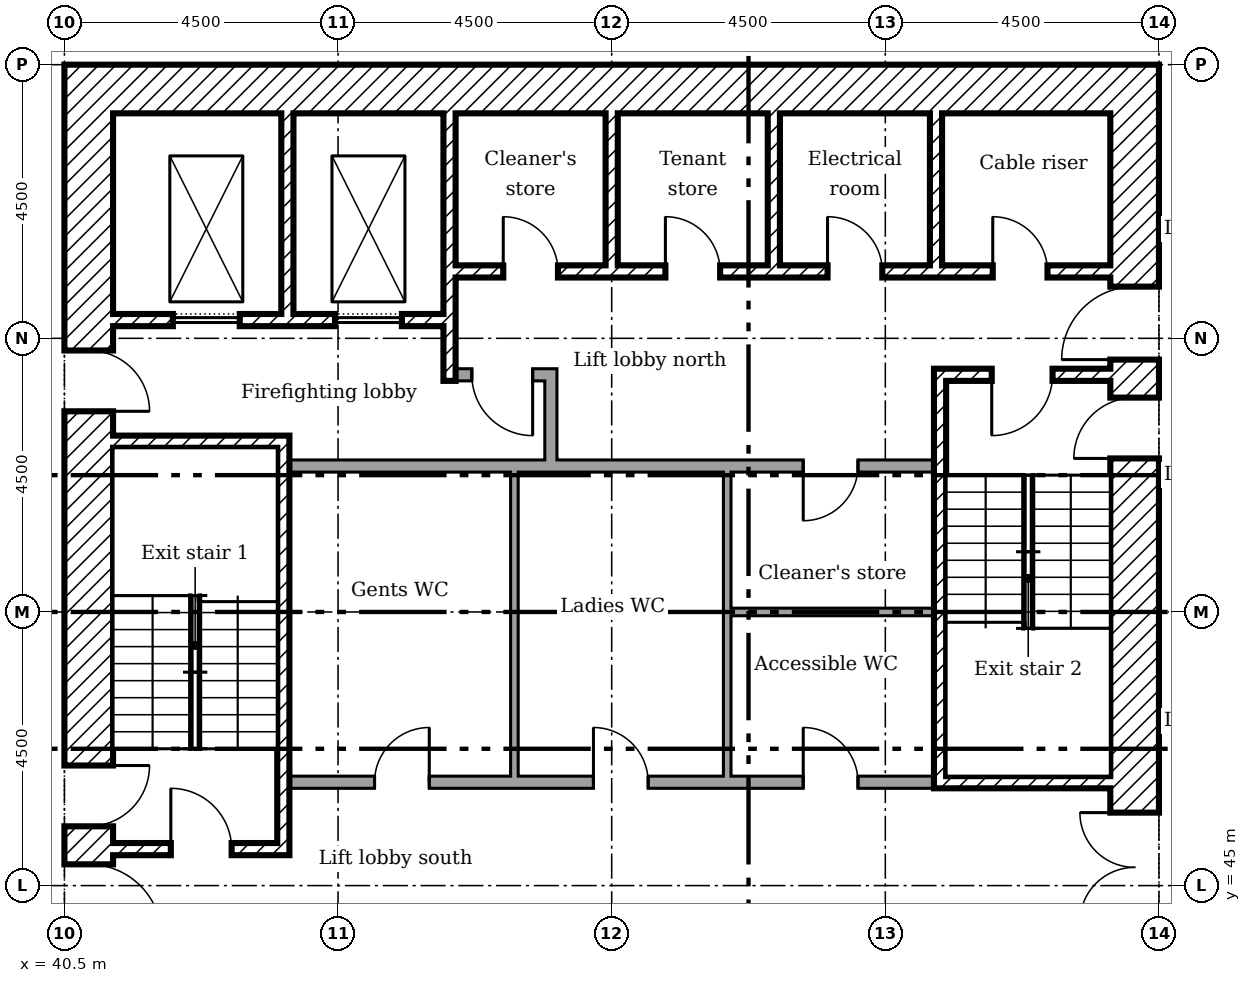
"""IFC4 building model, lengths in metres.
Left out: names, types, materials, properties, quantities, classifications, styles, units other than length and angle.
Written with IfcOpenShell. Run it as: python <this file> out.ifc"""

import sys

from ifc_helpers import new_model, si_unit, direction, frame, frame_2d, origin, place, context, subcontext, project, spatial, rectangle, extrude, element, fill, save


model = new_model("IFC4")
c1 = context("Model", 3, precision=1e-05, world=origin(), true_north=direction((0.0, 1.0)))
c2 = subcontext(c1, "Body", "Model", "MODEL_VIEW")
j1 = project(units=[si_unit("LENGTHUNIT", "METRE"), si_unit("PLANEANGLEUNIT", "RADIAN")], contexts=[c1])
p1 = place(None, origin())
s1 = spatial("IfcSite", under=j1, at=p1, CompositionType="ELEMENT")
p2 = place(p1, origin())
s2 = spatial("IfcBuilding", under=s1, at=p2, CompositionType="ELEMENT")
p3 = place(p2, frame((0.0, 0.0, 69.0)))
s3 = spatial("IfcBuildingStorey", under=s2, at=p3, CompositionType="ELEMENT", Elevation=69.0)
p4 = place(p3, frame((58.1, 40.5, 0.0), z_axis=(0.0, 0.0, 1.0), x_axis=(0.0, 1.0, 0.0)))
e1 = element("IfcWall", 1, at=p4, inside=s3, PredefinedType="SHEAR", context=c2, shape_type="SweptSolid", body=[
    extrude(rectangle(XDim=18.0, YDim=0.8, at=frame_2d((9.0, 0.0))), origin(), (0.0, 0.0, 1.0), 3.35),
])
p5 = place(p4, frame((13.15, 0.0, 0.0)))
e2 = element("IfcOpeningElement", 2, at=p5, cuts=e1, PredefinedType="OPENING", context=c2, shape_type="SweptSolid", body=[
    extrude(rectangle(XDim=1.2, YDim=2.1, at=frame_2d((0.6, 1.05))), frame((0.0, 0.41, 0.0), z_axis=(0.0, -1.0, 0.0), x_axis=(1.0, 0.0, 0.0)), (0.0, 0.0, 1.0), 0.82),
])
p6 = place(p4, frame((3.9, 0.0, 0.0)))
e3 = element("IfcOpeningElement", 3, at=p6, cuts=e1, PredefinedType="OPENING", context=c2, shape_type="SweptSolid", body=[
    extrude(rectangle(XDim=1.8, YDim=2.1, at=frame_2d((0.9, 1.05))), frame((0.0, 0.41, 0.0), z_axis=(0.0, -1.0, 0.0), x_axis=(1.0, 0.0, 0.0)), (0.0, 0.0, 1.0), 0.82),
])
p7 = place(p4, frame((11.525, 0.0, 0.0)))
e4 = element("IfcOpeningElement", 4, at=p7, cuts=e1, PredefinedType="OPENING", context=c2, shape_type="SweptSolid", body=[
    extrude(rectangle(XDim=1.0, YDim=2.1, at=frame_2d((0.5, 1.05))), frame((0.0, 0.41, 0.0), z_axis=(0.0, -1.0, 0.0), x_axis=(1.0, 0.0, 0.0)), (0.0, 0.0, 1.0), 0.82),
])
p8 = place(p3, frame((41.3, 58.1, 0.0)))
e5 = element("IfcWall", 5, at=p8, inside=s3, PredefinedType="SHEAR", context=c2, shape_type="SweptSolid", body=[
    extrude(rectangle(XDim=16.4, YDim=0.8, at=frame_2d((8.2, 0.0))), origin(), (0.0, 0.0, 1.0), 3.35),
])
p9 = place(p3, frame((40.9, 40.5, 0.0), z_axis=(0.0, 0.0, 1.0), x_axis=(0.0, 1.0, 0.0)))
e6 = element("IfcWall", 6, at=p9, inside=s3, PredefinedType="SHEAR", context=c2, shape_type="SweptSolid", body=[
    extrude(rectangle(XDim=18.0, YDim=0.8, at=frame_2d((9.0, 0.0))), origin(), (0.0, 0.0, 1.0), 3.35),
])
p10 = place(p9, frame((3.65, 0.0, 0.0)))
e7 = element("IfcOpeningElement", 7, at=p10, cuts=e6, PredefinedType="OPENING", context=c2, shape_type="SweptSolid", body=[
    extrude(rectangle(XDim=1.2, YDim=2.1, at=frame_2d((0.6, 1.05))), frame((0.0, 0.41, 0.0), z_axis=(0.0, -1.0, 0.0), x_axis=(1.0, 0.0, 0.0)), (0.0, 0.0, 1.0), 0.82),
])
p11 = place(p9, frame((5.475, 0.0, 0.0)))
e8 = element("IfcOpeningElement", 8, at=p11, cuts=e6, PredefinedType="OPENING", context=c2, shape_type="SweptSolid", body=[
    extrude(rectangle(XDim=1.0, YDim=2.1, at=frame_2d((0.5, 1.05))), frame((0.0, 0.41, 0.0), z_axis=(0.0, -1.0, 0.0), x_axis=(1.0, 0.0, 0.0)), (0.0, 0.0, 1.0), 0.82),
])
p12 = place(p9, frame((12.3, 0.0, 0.0)))
e9 = element("IfcOpeningElement", 9, at=p12, cuts=e6, PredefinedType="OPENING", context=c2, shape_type="SweptSolid", body=[
    extrude(rectangle(XDim=1.0, YDim=2.1, at=frame_2d((0.5, 1.05))), frame((0.0, 0.41, 0.0), z_axis=(0.0, -1.0, 0.0), x_axis=(1.0, 0.0, 0.0)), (0.0, 0.0, 1.0), 0.82),
])
p13 = place(p3, frame((44.167, 57.7, 0.0), z_axis=(0.0, 0.0, 1.0), x_axis=(0.0, -1.0, 0.0)))
e10 = element("IfcWall", 10, at=p13, inside=s3, PredefinedType="SHEAR", context=c2, shape_type="SweptSolid", body=[
    extrude(rectangle(XDim=3.3, YDim=0.2, at=frame_2d((1.65, 0.0))), origin(), (0.0, 0.0, 1.0), 3.35),
])
p14 = place(p3, frame((46.833, 57.7, 0.0), z_axis=(0.0, 0.0, 1.0), x_axis=(0.0, -1.0, 0.0)))
e11 = element("IfcWall", 11, at=p14, inside=s3, PredefinedType="SHEAR", context=c2, shape_type="SweptSolid", body=[
    extrude(rectangle(XDim=4.4, YDim=0.2, at=frame_2d((2.2, 0.0))), origin(), (0.0, 0.0, 1.0), 3.35),
])
for number, where, z_axis, x_axis in (
    (12, (49.5, 57.7, 0.0), (0.0, 0.0, 1.0), (0.0, -1.0, 0.0)),
    (13, (52.167, 57.7, 0.0), (0.0, 0.0, 1.0), (0.0, -1.0, 0.0)),
    (14, (54.833, 57.7, 0.0), (0.0, 0.0, 1.0), (0.0, -1.0, 0.0)),
):
    element("IfcWall", number, at=place(p3, frame(where, z_axis=z_axis, x_axis=x_axis)), inside=s3, PredefinedType="SHEAR", context=c2, shape_type="SweptSolid", body=[
        extrude(rectangle(XDim=2.5, YDim=0.2, at=frame_2d((1.25, 0.0))), origin(), (0.0, 0.0, 1.0), 3.35),
    ])
p15 = place(p3, frame((48.5, 51.9, 0.0), z_axis=(0.0, 0.0, 1.0), x_axis=(0.0, 1.0, 0.0)))
e15 = element("IfcWall", 15, at=p15, inside=s3, PredefinedType="PARTITIONING", context=c2, shape_type="SweptSolid", body=[
    extrude(rectangle(XDim=1.6, YDim=0.2, at=frame_2d((0.8, 0.0))), origin(), (0.0, 0.0, 1.0), 3.35),
])
p16 = place(p3, frame((46.933, 53.4, 0.0)))
e16 = element("IfcWall", 16, at=p16, inside=s3, PredefinedType="PARTITIONING", context=c2, shape_type="SweptSolid", body=[
    extrude(rectangle(XDim=1.467, YDim=0.2, at=frame_2d((0.733, 0.0))), origin(), (0.0, 0.0, 1.0), 3.35),
])
p17 = place(p16, frame((0.267, 0.0, 0.0)))
e17 = element("IfcOpeningElement", 17, at=p17, cuts=e16, PredefinedType="OPENING", context=c2, shape_type="SweptSolid", body=[
    extrude(rectangle(XDim=1.0, YDim=2.1, at=frame_2d((0.5, 1.05))), frame((0.0, 0.11, 0.0), z_axis=(0.0, -1.0, 0.0), x_axis=(1.0, 0.0, 0.0)), (0.0, 0.0, 1.0), 0.22),
])
p18 = place(p3, frame((46.933, 55.1, 0.0)))
e18 = element("IfcWall", 18, at=p18, inside=s3, PredefinedType="SHEAR", context=c2, shape_type="SweptSolid", body=[
    extrude(rectangle(XDim=10.767, YDim=0.2, at=frame_2d((5.383, 0.0))), origin(), (0.0, 0.0, 1.0), 3.35),
])
p19 = place(p18, frame((8.833, 0.0, 0.0)))
e19 = element("IfcOpeningElement", 19, at=p19, cuts=e18, PredefinedType="OPENING", context=c2, shape_type="SweptSolid", body=[
    extrude(rectangle(XDim=0.9, YDim=2.1, at=frame_2d((0.45, 1.05))), frame((0.0, 0.11, 0.0), z_axis=(0.0, -1.0, 0.0), x_axis=(1.0, 0.0, 0.0)), (0.0, 0.0, 1.0), 0.22),
])
p20 = place(p18, frame((0.783, 0.0, 0.0)))
e20 = element("IfcOpeningElement", 20, at=p20, cuts=e18, PredefinedType="OPENING", context=c2, shape_type="SweptSolid", body=[
    extrude(rectangle(XDim=0.9, YDim=2.1, at=frame_2d((0.45, 1.05))), frame((0.0, 0.11, 0.0), z_axis=(0.0, -1.0, 0.0), x_axis=(1.0, 0.0, 0.0)), (0.0, 0.0, 1.0), 0.22),
])
p21 = place(p18, frame((3.45, 0.0, 0.0)))
e21 = element("IfcOpeningElement", 21, at=p21, cuts=e18, PredefinedType="OPENING", context=c2, shape_type="SweptSolid", body=[
    extrude(rectangle(XDim=0.9, YDim=2.1, at=frame_2d((0.45, 1.05))), frame((0.0, 0.11, 0.0), z_axis=(0.0, -1.0, 0.0), x_axis=(1.0, 0.0, 0.0)), (0.0, 0.0, 1.0), 0.22),
])
p22 = place(p18, frame((6.117, 0.0, 0.0)))
e22 = element("IfcOpeningElement", 22, at=p22, cuts=e18, PredefinedType="OPENING", context=c2, shape_type="SweptSolid", body=[
    extrude(rectangle(XDim=0.9, YDim=2.1, at=frame_2d((0.45, 1.05))), frame((0.0, 0.11, 0.0), z_axis=(0.0, -1.0, 0.0), x_axis=(1.0, 0.0, 0.0)), (0.0, 0.0, 1.0), 0.22),
])
p23 = place(p3, frame((41.3, 54.3, 0.0)))
e23 = element("IfcWall", 23, at=p23, inside=s3, PredefinedType="SHEAR", context=c2, shape_type="SweptSolid", body=[
    extrude(rectangle(XDim=5.433, YDim=0.2, at=frame_2d((2.717, 0.0))), origin(), (0.0, 0.0, 1.0), 3.35),
])
p24 = place(p23, frame((0.983, 0.0, 0.0)))
e24 = element("IfcOpeningElement", 24, at=p24, cuts=e23, PredefinedType="OPENING", context=c2, shape_type="SweptSolid", body=[
    extrude(rectangle(XDim=1.1, YDim=2.1, at=frame_2d((0.55, 1.05))), frame((0.0, 0.11, 0.0), z_axis=(0.0, -1.0, 0.0), x_axis=(1.0, 0.0, 0.0)), (0.0, 0.0, 1.0), 0.22),
])
p25 = place(p23, frame((3.65, 0.0, 0.0)))
e25 = element("IfcOpeningElement", 25, at=p25, cuts=e23, PredefinedType="OPENING", context=c2, shape_type="SweptSolid", body=[
    extrude(rectangle(XDim=1.1, YDim=2.1, at=frame_2d((0.55, 1.05))), frame((0.0, 0.11, 0.0), z_axis=(0.0, -1.0, 0.0), x_axis=(1.0, 0.0, 0.0)), (0.0, 0.0, 1.0), 0.22),
])
p26 = place(p3, frame((44.1, 45.5, 0.0), z_axis=(0.0, 0.0, 1.0), x_axis=(0.0, 1.0, 0.0)))
e26 = element("IfcWall", 26, at=p26, inside=s3, PredefinedType="SHEAR", context=c2, shape_type="SweptSolid", body=[
    extrude(rectangle(XDim=6.9, YDim=0.2, at=frame_2d((3.45, 0.0))), origin(), (0.0, 0.0, 1.0), 3.35),
])
p27 = place(p3, frame((41.3, 52.3, 0.0)))
e27 = element("IfcWall", 27, at=p27, inside=s3, PredefinedType="SHEAR", context=c2, shape_type="SweptSolid", body=[
    extrude(rectangle(XDim=2.7, YDim=0.2, at=frame_2d((1.35, 0.0))), origin(), (0.0, 0.0, 1.0), 3.35),
])
p28 = place(p3, frame((41.3, 45.6, 0.0)))
e28 = element("IfcWall", 28, at=p28, inside=s3, PredefinedType="SHEAR", context=c2, shape_type="SweptSolid", body=[
    extrude(rectangle(XDim=2.7, YDim=0.2, at=frame_2d((1.35, 0.0))), origin(), (0.0, 0.0, 1.0), 3.35),
])
p29 = place(p28, frame((0.95, 0.0, 0.0)))
e29 = element("IfcOpeningElement", 29, at=p29, cuts=e28, PredefinedType="OPENING", context=c2, shape_type="SweptSolid", body=[
    extrude(rectangle(XDim=1.0, YDim=2.1, at=frame_2d((0.5, 1.05))), frame((0.0, 0.11, 0.0), z_axis=(0.0, -1.0, 0.0), x_axis=(1.0, 0.0, 0.0)), (0.0, 0.0, 1.0), 0.22),
])
p30 = place(p3, frame((54.8, 53.4, 0.0)))
e30 = element("IfcWall", 30, at=p30, inside=s3, PredefinedType="SHEAR", context=c2, shape_type="SweptSolid", body=[
    extrude(rectangle(XDim=2.9, YDim=0.2, at=frame_2d((1.45, 0.0))), origin(), (0.0, 0.0, 1.0), 3.35),
])
p31 = place(p30, frame((0.95, 0.0, 0.0)))
e31 = element("IfcOpeningElement", 31, at=p31, cuts=e30, PredefinedType="OPENING", context=c2, shape_type="SweptSolid", body=[
    extrude(rectangle(XDim=1.0, YDim=2.1, at=frame_2d((0.5, 1.05))), frame((0.0, 0.11, 0.0), z_axis=(0.0, -1.0, 0.0), x_axis=(1.0, 0.0, 0.0)), (0.0, 0.0, 1.0), 0.22),
])
p32 = place(p3, frame((54.8, 46.7, 0.0)))
e32 = element("IfcWall", 32, at=p32, inside=s3, PredefinedType="SHEAR", context=c2, shape_type="SweptSolid", body=[
    extrude(rectangle(XDim=2.9, YDim=0.2, at=frame_2d((1.45, 0.0))), origin(), (0.0, 0.0, 1.0), 3.35),
])
p33 = place(p3, frame((54.9, 46.8, 0.0), z_axis=(0.0, 0.0, 1.0), x_axis=(0.0, 1.0, 0.0)))
e33 = element("IfcWall", 33, at=p33, inside=s3, PredefinedType="SHEAR", context=c2, shape_type="SweptSolid", body=[
    extrude(rectangle(XDim=6.5, YDim=0.2, at=frame_2d((3.25, 0.0))), origin(), (0.0, 0.0, 1.0), 3.35),
])
p34 = place(p3, frame((44.2, 51.9, 0.0)))
e34 = element("IfcWall", 34, at=p34, inside=s3, PredefinedType="PARTITIONING", context=c2, shape_type="SweptSolid", body=[
    extrude(rectangle(XDim=10.6, YDim=0.2, at=frame_2d((5.3, 0.0))), origin(), (0.0, 0.0, 1.0), 3.35),
])
p35 = place(p34, frame((8.45, 0.0, 0.0)))
e35 = element("IfcOpeningElement", 35, at=p35, cuts=e34, PredefinedType="OPENING", context=c2, shape_type="SweptSolid", body=[
    extrude(rectangle(XDim=0.9, YDim=2.1, at=frame_2d((0.45, 1.05))), frame((0.0, 0.11, 0.0), z_axis=(0.0, -1.0, 0.0), x_axis=(1.0, 0.0, 0.0)), (0.0, 0.0, 1.0), 0.22),
])
p36 = place(p3, frame((44.2, 46.7, 0.0)))
e36 = element("IfcWall", 36, at=p36, inside=s3, PredefinedType="PARTITIONING", context=c2, shape_type="SweptSolid", body=[
    extrude(rectangle(XDim=10.6, YDim=0.2, at=frame_2d((5.3, 0.0))), origin(), (0.0, 0.0, 1.0), 3.35),
])
p37 = place(p36, frame((1.4, 0.0, 0.0)))
e37 = element("IfcOpeningElement", 37, at=p37, cuts=e36, PredefinedType="OPENING", context=c2, shape_type="SweptSolid", body=[
    extrude(rectangle(XDim=0.9, YDim=2.1, at=frame_2d((0.45, 1.05))), frame((0.0, 0.11, 0.0), z_axis=(0.0, -1.0, 0.0), x_axis=(1.0, 0.0, 0.0)), (0.0, 0.0, 1.0), 0.22),
])
p38 = place(p36, frame((5.0, 0.0, 0.0)))
e38 = element("IfcOpeningElement", 38, at=p38, cuts=e36, PredefinedType="OPENING", context=c2, shape_type="SweptSolid", body=[
    extrude(rectangle(XDim=0.9, YDim=2.1, at=frame_2d((0.45, 1.05))), frame((0.0, 0.11, 0.0), z_axis=(0.0, -1.0, 0.0), x_axis=(1.0, 0.0, 0.0)), (0.0, 0.0, 1.0), 0.22),
])
p39 = place(p36, frame((8.45, 0.0, 0.0)))
e39 = element("IfcOpeningElement", 39, at=p39, cuts=e36, PredefinedType="OPENING", context=c2, shape_type="SweptSolid", body=[
    extrude(rectangle(XDim=0.9, YDim=2.1, at=frame_2d((0.45, 1.05))), frame((0.0, 0.11, 0.0), z_axis=(0.0, -1.0, 0.0), x_axis=(1.0, 0.0, 0.0)), (0.0, 0.0, 1.0), 0.22),
])
p40 = place(p3, frame((47.9, 46.8, 0.0), z_axis=(0.0, 0.0, 1.0), x_axis=(0.0, 1.0, 0.0)))
e40 = element("IfcWall", 40, at=p40, inside=s3, PredefinedType="PARTITIONING", context=c2, shape_type="SweptSolid", body=[
    extrude(rectangle(XDim=5.0, YDim=0.125, at=frame_2d((2.5, 0.0))), origin(), (0.0, 0.0, 1.0), 3.35),
])
p41 = place(p3, frame((51.4, 46.8, 0.0), z_axis=(0.0, 0.0, 1.0), x_axis=(0.0, 1.0, 0.0)))
e41 = element("IfcWall", 41, at=p41, inside=s3, PredefinedType="PARTITIONING", context=c2, shape_type="SweptSolid", body=[
    extrude(rectangle(XDim=2.762, YDim=0.125, at=frame_2d((1.381, 0.0))), origin(), (0.0, 0.0, 1.0), 3.35),
])
p42 = place(p3, frame((54.8, 49.5, 0.0), z_axis=(0.0, 0.0, 1.0), x_axis=(-1.0, 0.0, 0.0)))
e42 = element("IfcWall", 42, at=p42, inside=s3, PredefinedType="PARTITIONING", context=c2, shape_type="SweptSolid", body=[
    extrude(rectangle(XDim=3.338, YDim=0.125, at=frame_2d((1.669, 0.0))), origin(), (0.0, 0.0, 1.0), 3.35),
])
p43 = place(p3, frame((51.4, 49.5, 0.0), z_axis=(0.0, 0.0, 1.0), x_axis=(0.0, 1.0, 0.0)))
e43 = element("IfcWall", 43, at=p43, inside=s3, PredefinedType="PARTITIONING", context=c2, shape_type="SweptSolid", body=[
    extrude(rectangle(XDim=2.3, YDim=0.125, at=frame_2d((1.15, 0.0))), origin(), (0.0, 0.0, 1.0), 3.35),
])
p44 = place(p5, origin())
e44 = element("IfcDoor", 44, at=p44, inside=s3, OperationType="SINGLE_SWING_RIGHT", PredefinedType="DOOR", context=c2, shape_type="SweptSolid", body=[
    extrude(rectangle(XDim=1.2, YDim=2.1, at=frame_2d((0.6, 1.05))), frame((0.0, 0.025, 0.0), z_axis=(0.0, -1.0, 0.0), x_axis=(1.0, 0.0, 0.0)), (0.0, 0.0, 1.0), 0.05),
])
fill(e2, e44)
p45 = place(p6, origin())
e45 = element("IfcDoor", 45, at=p45, inside=s3, OperationType="DOUBLE_DOOR_SINGLE_SWING", PredefinedType="DOOR", context=c2, shape_type="SweptSolid", body=[
    extrude(rectangle(XDim=1.8, YDim=2.1, at=frame_2d((0.9, 1.05))), frame((0.0, 0.025, 0.0), z_axis=(0.0, -1.0, 0.0), x_axis=(1.0, 0.0, 0.0)), (0.0, 0.0, 1.0), 0.05),
])
fill(e3, e45)
p46 = place(p10, frame((1.2, 0.0, 0.0), x_axis=(-1.0, 0.0, 0.0)))
e46 = element("IfcDoor", 46, at=p46, inside=s3, OperationType="SINGLE_SWING_LEFT", PredefinedType="DOOR", context=c2, shape_type="SweptSolid", body=[
    extrude(rectangle(XDim=1.2, YDim=2.1, at=frame_2d((0.6, 1.05))), frame((0.0, 0.025, 0.0), z_axis=(0.0, -1.0, 0.0), x_axis=(1.0, 0.0, 0.0)), (0.0, 0.0, 1.0), 0.05),
])
fill(e7, e46)
p47 = place(p29, origin())
e47 = element("IfcDoor", 47, at=p47, inside=s3, OperationType="SINGLE_SWING_RIGHT", PredefinedType="DOOR", context=c2, shape_type="SweptSolid", body=[
    extrude(rectangle(XDim=1.0, YDim=2.1, at=frame_2d((0.5, 1.05))), frame((0.0, 0.025, 0.0), z_axis=(0.0, -1.0, 0.0), x_axis=(1.0, 0.0, 0.0)), (0.0, 0.0, 1.0), 0.05),
])
fill(e29, e47)
p48 = place(p11, frame((1.0, 0.0, 0.0), x_axis=(-1.0, 0.0, 0.0)))
e48 = element("IfcDoor", 48, at=p48, inside=s3, OperationType="SINGLE_SWING_RIGHT", PredefinedType="DOOR", context=c2, shape_type="SweptSolid", body=[
    extrude(rectangle(XDim=1.0, YDim=2.1, at=frame_2d((0.5, 1.05))), frame((0.0, 0.025, 0.0), z_axis=(0.0, -1.0, 0.0), x_axis=(1.0, 0.0, 0.0)), (0.0, 0.0, 1.0), 0.05),
])
fill(e8, e48)
p49 = place(p31, frame((1.0, 0.0, 0.0), x_axis=(-1.0, 0.0, 0.0)))
e49 = element("IfcDoor", 49, at=p49, inside=s3, OperationType="SINGLE_SWING_LEFT", PredefinedType="DOOR", context=c2, shape_type="SweptSolid", body=[
    extrude(rectangle(XDim=1.0, YDim=2.1, at=frame_2d((0.5, 1.05))), frame((0.0, 0.025, 0.0), z_axis=(0.0, -1.0, 0.0), x_axis=(1.0, 0.0, 0.0)), (0.0, 0.0, 1.0), 0.05),
])
fill(e31, e49)
p50 = place(p7, origin())
e50 = element("IfcDoor", 50, at=p50, inside=s3, OperationType="SINGLE_SWING_RIGHT", PredefinedType="DOOR", context=c2, shape_type="SweptSolid", body=[
    extrude(rectangle(XDim=1.0, YDim=2.1, at=frame_2d((0.5, 1.05))), frame((0.0, 0.025, 0.0), z_axis=(0.0, -1.0, 0.0), x_axis=(1.0, 0.0, 0.0)), (0.0, 0.0, 1.0), 0.05),
])
fill(e4, e50)
p51 = place(p17, frame((1.0, 0.0, 0.0), x_axis=(-1.0, 0.0, 0.0)))
e51 = element("IfcDoor", 51, at=p51, inside=s3, OperationType="SINGLE_SWING_RIGHT", PredefinedType="DOOR", context=c2, shape_type="SweptSolid", body=[
    extrude(rectangle(XDim=1.0, YDim=2.1, at=frame_2d((0.5, 1.05))), frame((0.0, 0.025, 0.0), z_axis=(0.0, -1.0, 0.0), x_axis=(1.0, 0.0, 0.0)), (0.0, 0.0, 1.0), 0.05),
])
fill(e17, e51)
p52 = place(p12, frame((1.0, 0.0, 0.0), x_axis=(-1.0, 0.0, 0.0)))
e52 = element("IfcDoor", 52, at=p52, inside=s3, OperationType="SINGLE_SWING_LEFT", PredefinedType="DOOR", context=c2, shape_type="SweptSolid", body=[
    extrude(rectangle(XDim=1.0, YDim=2.1, at=frame_2d((0.5, 1.05))), frame((0.0, 0.025, 0.0), z_axis=(0.0, -1.0, 0.0), x_axis=(1.0, 0.0, 0.0)), (0.0, 0.0, 1.0), 0.05),
])
fill(e9, e52)
p53 = place(p19, origin())
e53 = element("IfcDoor", 53, at=p53, inside=s3, OperationType="SINGLE_SWING_RIGHT", PredefinedType="DOOR", context=c2, shape_type="SweptSolid", body=[
    extrude(rectangle(XDim=0.9, YDim=2.1, at=frame_2d((0.45, 1.05))), frame((0.0, 0.025, 0.0), z_axis=(0.0, -1.0, 0.0), x_axis=(1.0, 0.0, 0.0)), (0.0, 0.0, 1.0), 0.05),
])
fill(e19, e53)
p54 = place(p20, origin())
e54 = element("IfcDoor", 54, at=p54, inside=s3, OperationType="SINGLE_SWING_RIGHT", PredefinedType="DOOR", context=c2, shape_type="SweptSolid", body=[
    extrude(rectangle(XDim=0.9, YDim=2.1, at=frame_2d((0.45, 1.05))), frame((0.0, 0.025, 0.0), z_axis=(0.0, -1.0, 0.0), x_axis=(1.0, 0.0, 0.0)), (0.0, 0.0, 1.0), 0.05),
])
fill(e20, e54)
p55 = place(p21, origin())
e55 = element("IfcDoor", 55, at=p55, inside=s3, OperationType="SINGLE_SWING_RIGHT", PredefinedType="DOOR", context=c2, shape_type="SweptSolid", body=[
    extrude(rectangle(XDim=0.9, YDim=2.1, at=frame_2d((0.45, 1.05))), frame((0.0, 0.025, 0.0), z_axis=(0.0, -1.0, 0.0), x_axis=(1.0, 0.0, 0.0)), (0.0, 0.0, 1.0), 0.05),
])
fill(e21, e55)
p56 = place(p22, origin())
e56 = element("IfcDoor", 56, at=p56, inside=s3, OperationType="SINGLE_SWING_RIGHT", PredefinedType="DOOR", context=c2, shape_type="SweptSolid", body=[
    extrude(rectangle(XDim=0.9, YDim=2.1, at=frame_2d((0.45, 1.05))), frame((0.0, 0.025, 0.0), z_axis=(0.0, -1.0, 0.0), x_axis=(1.0, 0.0, 0.0)), (0.0, 0.0, 1.0), 0.05),
])
fill(e22, e56)
p57 = place(p37, origin())
e57 = element("IfcDoor", 57, at=p57, inside=s3, OperationType="SINGLE_SWING_LEFT", PredefinedType="DOOR", context=c2, shape_type="SweptSolid", body=[
    extrude(rectangle(XDim=0.9, YDim=2.1, at=frame_2d((0.45, 1.05))), frame((0.0, 0.025, 0.0), z_axis=(0.0, -1.0, 0.0), x_axis=(1.0, 0.0, 0.0)), (0.0, 0.0, 1.0), 0.05),
])
fill(e37, e57)
p58 = place(p38, origin())
e58 = element("IfcDoor", 58, at=p58, inside=s3, OperationType="SINGLE_SWING_RIGHT", PredefinedType="DOOR", context=c2, shape_type="SweptSolid", body=[
    extrude(rectangle(XDim=0.9, YDim=2.1, at=frame_2d((0.45, 1.05))), frame((0.0, 0.025, 0.0), z_axis=(0.0, -1.0, 0.0), x_axis=(1.0, 0.0, 0.0)), (0.0, 0.0, 1.0), 0.05),
])
fill(e38, e58)
p59 = place(p39, origin())
e59 = element("IfcDoor", 59, at=p59, inside=s3, OperationType="SINGLE_SWING_RIGHT", PredefinedType="DOOR", context=c2, shape_type="SweptSolid", body=[
    extrude(rectangle(XDim=0.9, YDim=2.1, at=frame_2d((0.45, 1.05))), frame((0.0, 0.025, 0.0), z_axis=(0.0, -1.0, 0.0), x_axis=(1.0, 0.0, 0.0)), (0.0, 0.0, 1.0), 0.05),
])
fill(e39, e59)
p60 = place(p35, frame((0.9, 0.0, 0.0), x_axis=(-1.0, 0.0, 0.0)))
e60 = element("IfcDoor", 60, at=p60, inside=s3, OperationType="SINGLE_SWING_LEFT", PredefinedType="DOOR", context=c2, shape_type="SweptSolid", body=[
    extrude(rectangle(XDim=0.9, YDim=2.1, at=frame_2d((0.45, 1.05))), frame((0.0, 0.025, 0.0), z_axis=(0.0, -1.0, 0.0), x_axis=(1.0, 0.0, 0.0)), (0.0, 0.0, 1.0), 0.05),
])
fill(e35, e60)
p61 = place(p24, origin())
e61 = element("IfcDoor", 61, at=p61, inside=s3, OperationType="SLIDING_TO_LEFT", PredefinedType="DOOR", context=c2, shape_type="SweptSolid", body=[
    extrude(rectangle(XDim=1.1, YDim=2.1, at=frame_2d((0.55, 1.05))), frame((0.0, 0.025, 0.0), z_axis=(0.0, -1.0, 0.0), x_axis=(1.0, 0.0, 0.0)), (0.0, 0.0, 1.0), 0.05),
])
fill(e24, e61)
p62 = place(p25, origin())
e62 = element("IfcDoor", 62, at=p62, inside=s3, OperationType="SLIDING_TO_LEFT", PredefinedType="DOOR", context=c2, shape_type="SweptSolid", body=[
    extrude(rectangle(XDim=1.1, YDim=2.1, at=frame_2d((0.55, 1.05))), frame((0.0, 0.025, 0.0), z_axis=(0.0, -1.0, 0.0), x_axis=(1.0, 0.0, 0.0)), (0.0, 0.0, 1.0), 0.05),
])
fill(e25, e62)
save(model, sys.argv[1])
